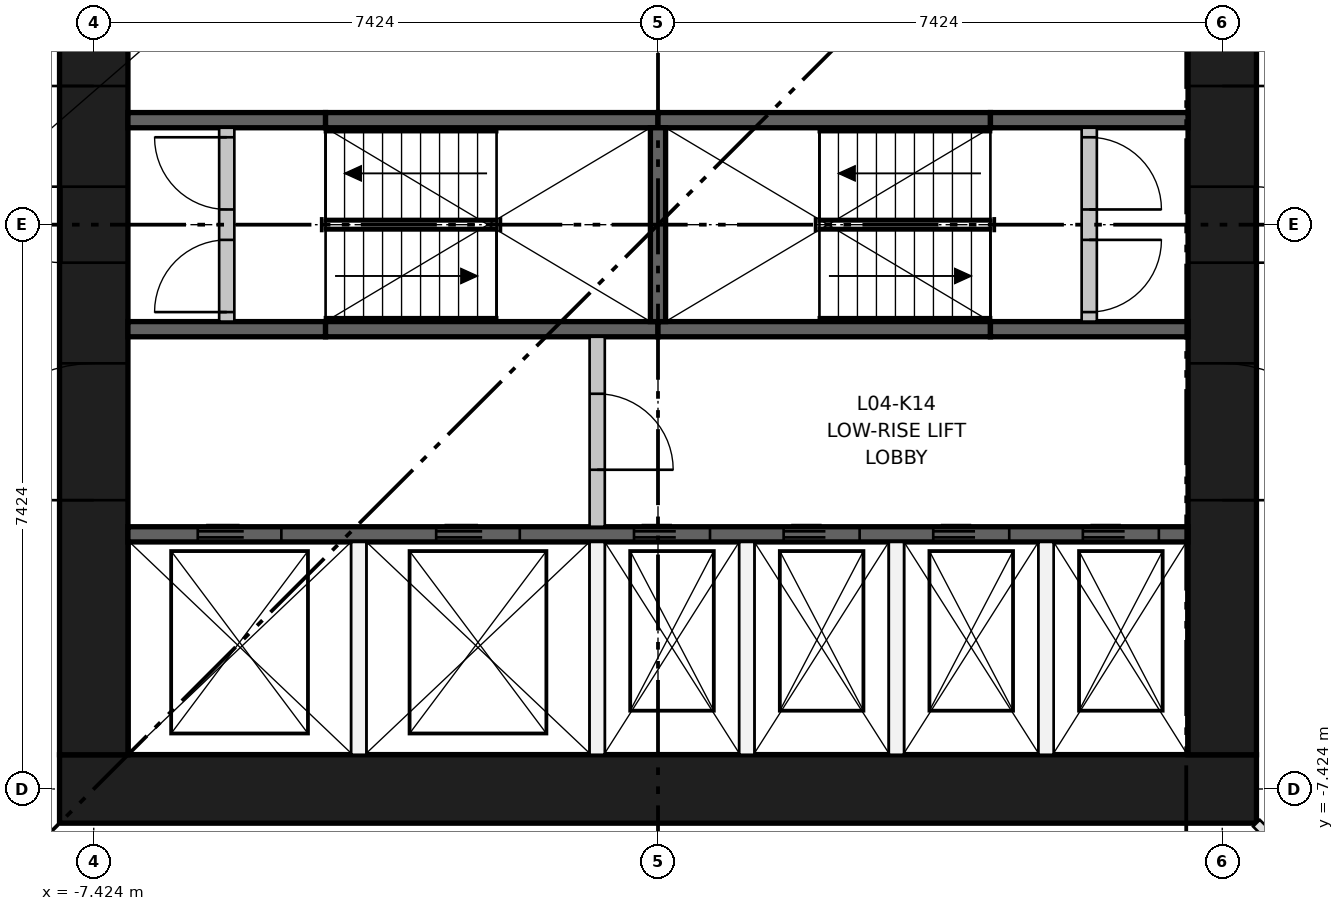
"""IFC4 building model, lengths in metres.
Left out: names, types, materials, properties, quantities, classifications, styles, units other than length and angle.
Written with IfcOpenShell. Run it as: python <this file> out.ifc"""

import sys

from ifc_helpers import new_model, si_unit, direction, frame, frame_2d, origin, place, context, subcontext, project, spatial, rectangle, extrude, element, fill, save


model = new_model("IFC4")
c1 = context("Model", 3, precision=1e-05, world=origin(), true_north=direction((0.0, 1.0)))
c2 = subcontext(c1, "Body", "Model", "MODEL_VIEW")
j1 = project(units=[si_unit("LENGTHUNIT", "METRE"), si_unit("PLANEANGLEUNIT", "RADIAN")], contexts=[c1])
p1 = place(None, origin())
s1 = spatial("IfcSite", under=j1, at=p1, CompositionType="ELEMENT")
p2 = place(p1, origin())
s2 = spatial("IfcBuilding", under=s1, at=p2, CompositionType="ELEMENT")
p3 = place(p2, frame((0.0, 0.0, 18.5)))
s3 = spatial("IfcBuildingStorey", under=s2, at=p3, CompositionType="ELEMENT", Elevation=18.5)
p4 = place(p3, frame((-7.874, -7.424, 0.0), z_axis=(0.0, 0.0, 1.0), x_axis=(1.0, 0.0, 0.0)))
e1 = element("IfcWall", 1, at=p4, inside=s3, PredefinedType="SHEAR", context=c2, shape_type="SweptSolid", body=[
    extrude(rectangle(XDim=15.748, YDim=0.9, at=frame_2d((7.874, 0.0))), origin(), (0.0, 0.0, 1.0), 3.9),
])
p5 = place(p3, frame((-7.424, -6.974, 0.0), z_axis=(0.0, 0.0, 1.0), x_axis=(0.0, 1.0, 0.0)))
e2 = element("IfcWall", 2, at=p5, inside=s3, PredefinedType="SHEAR", context=c2, shape_type="SweptSolid", body=[
    extrude(rectangle(XDim=13.948, YDim=0.9, at=frame_2d((6.974, 0.0))), origin(), (0.0, 0.0, 1.0), 3.9),
])
p6 = place(p5, frame((6.474, 0.0, 0.0)))
e3 = element("IfcOpeningElement", 3, at=p6, cuts=e2, PredefinedType="OPENING", context=c2, shape_type="SweptSolid", body=[
    extrude(rectangle(XDim=1.0, YDim=2.1, at=frame_2d((0.5, 1.05))), frame((0.0, 0.46, 0.0), z_axis=(0.0, -1.0, 0.0), x_axis=(1.0, 0.0, 0.0)), (0.0, 0.0, 1.0), 0.92),
])
p7 = place(p5, frame((3.35, 0.0, 0.0)))
e4 = element("IfcOpeningElement", 4, at=p7, cuts=e2, PredefinedType="OPENING", context=c2, shape_type="SweptSolid", body=[
    extrude(rectangle(XDim=1.8, YDim=2.1, at=frame_2d((0.9, 1.05))), frame((0.0, 0.46, 0.0), z_axis=(0.0, -1.0, 0.0), x_axis=(1.0, 0.0, 0.0)), (0.0, 0.0, 1.0), 0.92),
])
p8 = place(p5, frame((8.799, 0.0, 0.0)))
e5 = element("IfcOpeningElement", 5, at=p8, cuts=e2, PredefinedType="OPENING", context=c2, shape_type="SweptSolid", body=[
    extrude(rectangle(XDim=1.8, YDim=2.1, at=frame_2d((0.9, 1.05))), frame((0.0, 0.46, 0.0), z_axis=(0.0, -1.0, 0.0), x_axis=(1.0, 0.0, 0.0)), (0.0, 0.0, 1.0), 0.92),
])
p9 = place(p5, frame((11.974, 0.0, 0.0)))
e6 = element("IfcOpeningElement", 6, at=p9, cuts=e2, PredefinedType="OPENING", context=c2, shape_type="SweptSolid", body=[
    extrude(rectangle(XDim=1.0, YDim=2.1, at=frame_2d((0.5, 1.05))), frame((0.0, 0.46, 0.0), z_axis=(0.0, -1.0, 0.0), x_axis=(1.0, 0.0, 0.0)), (0.0, 0.0, 1.0), 0.92),
])
p10 = place(p3, frame((7.424, -6.974, 0.0), z_axis=(0.0, 0.0, 1.0), x_axis=(0.0, 1.0, 0.0)))
e7 = element("IfcWall", 7, at=p10, inside=s3, PredefinedType="SHEAR", context=c2, shape_type="SweptSolid", body=[
    extrude(rectangle(XDim=13.948, YDim=0.9, at=frame_2d((6.974, 0.0))), origin(), (0.0, 0.0, 1.0), 3.9),
])
p11 = place(p10, frame((6.474, 0.0, 0.0)))
e8 = element("IfcOpeningElement", 8, at=p11, cuts=e7, PredefinedType="OPENING", context=c2, shape_type="SweptSolid", body=[
    extrude(rectangle(XDim=1.0, YDim=2.1, at=frame_2d((0.5, 1.05))), frame((0.0, 0.46, 0.0), z_axis=(0.0, -1.0, 0.0), x_axis=(1.0, 0.0, 0.0)), (0.0, 0.0, 1.0), 0.92),
])
p12 = place(p10, frame((3.35, 0.0, 0.0)))
e9 = element("IfcOpeningElement", 9, at=p12, cuts=e7, PredefinedType="OPENING", context=c2, shape_type="SweptSolid", body=[
    extrude(rectangle(XDim=1.8, YDim=2.1, at=frame_2d((0.9, 1.05))), frame((0.0, 0.46, 0.0), z_axis=(0.0, -1.0, 0.0), x_axis=(1.0, 0.0, 0.0)), (0.0, 0.0, 1.0), 0.92),
])
p13 = place(p10, frame((8.799, 0.0, 0.0)))
e10 = element("IfcOpeningElement", 10, at=p13, cuts=e7, PredefinedType="OPENING", context=c2, shape_type="SweptSolid", body=[
    extrude(rectangle(XDim=1.8, YDim=2.1, at=frame_2d((0.9, 1.05))), frame((0.0, 0.46, 0.0), z_axis=(0.0, -1.0, 0.0), x_axis=(1.0, 0.0, 0.0)), (0.0, 0.0, 1.0), 0.92),
])
p14 = place(p3, frame((-6.974, -4.074, 0.0), z_axis=(0.0, 0.0, 1.0), x_axis=(1.0, 0.0, 0.0)))
e11 = element("IfcWall", 11, at=p14, inside=s3, PredefinedType="SHEAR", context=c2, shape_type="SweptSolid", body=[
    extrude(rectangle(XDim=13.948, YDim=0.2, at=frame_2d((6.974, 0.0))), origin(), (0.0, 0.0, 1.0), 3.55),
])
p15 = place(p14, frame((0.918, 0.0, 0.0)))
e12 = element("IfcOpeningElement", 12, at=p15, cuts=e11, PredefinedType="OPENING", context=c2, shape_type="SweptSolid", body=[
    extrude(rectangle(XDim=1.1, YDim=2.1, at=frame_2d((0.55, 1.05))), frame((0.0, 0.11, 0.0), z_axis=(0.0, -1.0, 0.0), x_axis=(1.0, 0.0, 0.0)), (0.0, 0.0, 1.0), 0.22),
])
p16 = place(p14, frame((4.055, 0.0, 0.0)))
e13 = element("IfcOpeningElement", 13, at=p16, cuts=e11, PredefinedType="OPENING", context=c2, shape_type="SweptSolid", body=[
    extrude(rectangle(XDim=1.1, YDim=2.1, at=frame_2d((0.55, 1.05))), frame((0.0, 0.11, 0.0), z_axis=(0.0, -1.0, 0.0), x_axis=(1.0, 0.0, 0.0)), (0.0, 0.0, 1.0), 0.22),
])
p17 = place(p14, frame((6.658, 0.0, 0.0)))
e14 = element("IfcOpeningElement", 14, at=p17, cuts=e11, PredefinedType="OPENING", context=c2, shape_type="SweptSolid", body=[
    extrude(rectangle(XDim=1.0, YDim=2.1, at=frame_2d((0.5, 1.05))), frame((0.0, 0.11, 0.0), z_axis=(0.0, -1.0, 0.0), x_axis=(1.0, 0.0, 0.0)), (0.0, 0.0, 1.0), 0.22),
])
p18 = place(p14, frame((8.627, 0.0, 0.0)))
e15 = element("IfcOpeningElement", 15, at=p18, cuts=e11, PredefinedType="OPENING", context=c2, shape_type="SweptSolid", body=[
    extrude(rectangle(XDim=1.0, YDim=2.1, at=frame_2d((0.5, 1.05))), frame((0.0, 0.11, 0.0), z_axis=(0.0, -1.0, 0.0), x_axis=(1.0, 0.0, 0.0)), (0.0, 0.0, 1.0), 0.22),
])
p19 = place(p14, frame((10.595, 0.0, 0.0)))
e16 = element("IfcOpeningElement", 16, at=p19, cuts=e11, PredefinedType="OPENING", context=c2, shape_type="SweptSolid", body=[
    extrude(rectangle(XDim=1.0, YDim=2.1, at=frame_2d((0.5, 1.05))), frame((0.0, 0.11, 0.0), z_axis=(0.0, -1.0, 0.0), x_axis=(1.0, 0.0, 0.0)), (0.0, 0.0, 1.0), 0.22),
])
p20 = place(p14, frame((12.564, 0.0, 0.0)))
e17 = element("IfcOpeningElement", 17, at=p20, cuts=e11, PredefinedType="OPENING", context=c2, shape_type="SweptSolid", body=[
    extrude(rectangle(XDim=1.0, YDim=2.1, at=frame_2d((0.5, 1.05))), frame((0.0, 0.11, 0.0), z_axis=(0.0, -1.0, 0.0), x_axis=(1.0, 0.0, 0.0)), (0.0, 0.0, 1.0), 0.22),
])
p21 = place(p3, frame((-6.974, -1.375, 0.0), z_axis=(0.0, 0.0, 1.0), x_axis=(1.0, 0.0, 0.0)))
e18 = element("IfcWall", 18, at=p21, inside=s3, PredefinedType="SHEAR", context=c2, shape_type="SweptSolid", body=[
    extrude(rectangle(XDim=2.6, YDim=0.2, at=frame_2d((1.3, 0.0))), origin(), (0.0, 0.0, 1.0), 3.55),
])
for number, where, z_axis, x_axis in (
    (19, (-4.374, -1.375, 0.0), (0.0, 0.0, 1.0), (1.0, 0.0, 0.0)),
    (20, (0.0, -1.375, 0.0), (0.0, 0.0, 1.0), (1.0, 0.0, 0.0)),
):
    element("IfcWall", number, at=place(p3, frame(where, z_axis=z_axis, x_axis=x_axis)), inside=s3, PredefinedType="SHEAR", context=c2, shape_type="SweptSolid", body=[
        extrude(rectangle(XDim=4.374, YDim=0.2, at=frame_2d((2.187, 0.0))), origin(), (0.0, 0.0, 1.0), 3.55),
    ])
for number, where, z_axis, x_axis in (
    (21, (4.374, -1.375, 0.0), (0.0, 0.0, 1.0), (1.0, 0.0, 0.0)),
    (22, (-6.974, 1.375, 0.0), (0.0, 0.0, 1.0), (1.0, 0.0, 0.0)),
):
    element("IfcWall", number, at=place(p3, frame(where, z_axis=z_axis, x_axis=x_axis)), inside=s3, PredefinedType="SHEAR", context=c2, shape_type="SweptSolid", body=[
        extrude(rectangle(XDim=2.6, YDim=0.2, at=frame_2d((1.3, 0.0))), origin(), (0.0, 0.0, 1.0), 3.55),
    ])
for number, where, z_axis, x_axis in (
    (23, (-4.374, 1.375, 0.0), (0.0, 0.0, 1.0), (1.0, 0.0, 0.0)),
    (24, (0.0, 1.375, 0.0), (0.0, 0.0, 1.0), (1.0, 0.0, 0.0)),
):
    element("IfcWall", number, at=place(p3, frame(where, z_axis=z_axis, x_axis=x_axis)), inside=s3, PredefinedType="SHEAR", context=c2, shape_type="SweptSolid", body=[
        extrude(rectangle(XDim=4.374, YDim=0.2, at=frame_2d((2.187, 0.0))), origin(), (0.0, 0.0, 1.0), 3.55),
    ])
p22 = place(p3, frame((4.374, 1.375, 0.0), z_axis=(0.0, 0.0, 1.0), x_axis=(1.0, 0.0, 0.0)))
e25 = element("IfcWall", 25, at=p22, inside=s3, PredefinedType="SHEAR", context=c2, shape_type="SweptSolid", body=[
    extrude(rectangle(XDim=2.6, YDim=0.2, at=frame_2d((1.3, 0.0))), origin(), (0.0, 0.0, 1.0), 3.55),
])
p23 = place(p3, frame((0.0, -1.275, 0.0), z_axis=(0.0, 0.0, 1.0), x_axis=(0.0, 1.0, 0.0)))
e26 = element("IfcWall", 26, at=p23, inside=s3, PredefinedType="SHEAR", context=c2, shape_type="SweptSolid", body=[
    extrude(rectangle(XDim=2.55, YDim=0.2, at=frame_2d((1.275, 0.0))), origin(), (0.0, 0.0, 1.0), 3.55),
])
for number, where, z_axis, x_axis in (
    (27, (-3.937, -6.974, 0.0), (0.0, 0.0, 1.0), (0.0, 1.0, 0.0)),
    (28, (-0.8, -6.974, 0.0), (0.0, 0.0, 1.0), (0.0, 1.0, 0.0)),
):
    element("IfcWall", number, at=place(p3, frame(where, z_axis=z_axis, x_axis=x_axis)), inside=s3, PredefinedType="PARTITIONING", context=c2, shape_type="SweptSolid", body=[
        extrude(rectangle(XDim=2.8, YDim=0.2, at=frame_2d((1.4, 0.0))), origin(), (0.0, 0.0, 1.0), 3.55),
    ])
p24 = place(p3, frame((-0.8, -3.974, 0.0), z_axis=(0.0, 0.0, 1.0), x_axis=(0.0, 1.0, 0.0)))
e29 = element("IfcWall", 29, at=p24, inside=s3, PredefinedType="PARTITIONING", context=c2, shape_type="SweptSolid", body=[
    extrude(rectangle(XDim=2.499, YDim=0.2, at=frame_2d((1.25, 0.0))), origin(), (0.0, 0.0, 1.0), 3.55),
])
p25 = place(p24, frame((0.75, 0.0, 0.0)))
e30 = element("IfcOpeningElement", 30, at=p25, cuts=e29, PredefinedType="OPENING", context=c2, shape_type="SweptSolid", body=[
    extrude(rectangle(XDim=1.0, YDim=2.1, at=frame_2d((0.5, 1.05))), frame((0.0, 0.11, 0.0), z_axis=(0.0, -1.0, 0.0), x_axis=(1.0, 0.0, 0.0)), (0.0, 0.0, 1.0), 0.22),
])
for number, where, z_axis, x_axis in (
    (31, (1.168, -6.974, 0.0), (0.0, 0.0, 1.0), (0.0, 1.0, 0.0)),
    (32, (3.137, -6.974, 0.0), (0.0, 0.0, 1.0), (0.0, 1.0, 0.0)),
    (33, (5.105, -6.974, 0.0), (0.0, 0.0, 1.0), (0.0, 1.0, 0.0)),
):
    element("IfcWall", number, at=place(p3, frame(where, z_axis=z_axis, x_axis=x_axis)), inside=s3, PredefinedType="PARTITIONING", context=c2, shape_type="SweptSolid", body=[
        extrude(rectangle(XDim=2.8, YDim=0.2, at=frame_2d((1.4, 0.0))), origin(), (0.0, 0.0, 1.0), 3.55),
    ])
p26 = place(p3, frame((-5.674, -1.275, 0.0), z_axis=(0.0, 0.0, 1.0), x_axis=(0.0, 1.0, 0.0)))
e34 = element("IfcWall", 34, at=p26, inside=s3, PredefinedType="PARTITIONING", context=c2, shape_type="SweptSolid", body=[
    extrude(rectangle(XDim=2.55, YDim=0.2, at=frame_2d((1.275, 0.0))), origin(), (0.0, 0.0, 1.0), 3.55),
])
p27 = place(p26, frame((0.125, 0.0, 0.0)))
e35 = element("IfcOpeningElement", 35, at=p27, cuts=e34, PredefinedType="OPENING", context=c2, shape_type="SweptSolid", body=[
    extrude(rectangle(XDim=0.95, YDim=2.1, at=frame_2d((0.475, 1.05))), frame((0.0, 0.11, 0.0), z_axis=(0.0, -1.0, 0.0), x_axis=(1.0, 0.0, 0.0)), (0.0, 0.0, 1.0), 0.22),
])
p28 = place(p26, frame((1.475, 0.0, 0.0)))
e36 = element("IfcOpeningElement", 36, at=p28, cuts=e34, PredefinedType="OPENING", context=c2, shape_type="SweptSolid", body=[
    extrude(rectangle(XDim=0.95, YDim=2.1, at=frame_2d((0.475, 1.05))), frame((0.0, 0.11, 0.0), z_axis=(0.0, -1.0, 0.0), x_axis=(1.0, 0.0, 0.0)), (0.0, 0.0, 1.0), 0.22),
])
p29 = place(p3, frame((5.674, -1.275, 0.0), z_axis=(0.0, 0.0, 1.0), x_axis=(0.0, 1.0, 0.0)))
e37 = element("IfcWall", 37, at=p29, inside=s3, PredefinedType="PARTITIONING", context=c2, shape_type="SweptSolid", body=[
    extrude(rectangle(XDim=2.55, YDim=0.2, at=frame_2d((1.275, 0.0))), origin(), (0.0, 0.0, 1.0), 3.55),
])
p30 = place(p29, frame((0.125, 0.0, 0.0)))
e38 = element("IfcOpeningElement", 38, at=p30, cuts=e37, PredefinedType="OPENING", context=c2, shape_type="SweptSolid", body=[
    extrude(rectangle(XDim=0.95, YDim=2.1, at=frame_2d((0.475, 1.05))), frame((0.0, 0.11, 0.0), z_axis=(0.0, -1.0, 0.0), x_axis=(1.0, 0.0, 0.0)), (0.0, 0.0, 1.0), 0.22),
])
p31 = place(p29, frame((1.475, 0.0, 0.0)))
e39 = element("IfcOpeningElement", 39, at=p31, cuts=e37, PredefinedType="OPENING", context=c2, shape_type="SweptSolid", body=[
    extrude(rectangle(XDim=0.95, YDim=2.1, at=frame_2d((0.475, 1.05))), frame((0.0, 0.11, 0.0), z_axis=(0.0, -1.0, 0.0), x_axis=(1.0, 0.0, 0.0)), (0.0, 0.0, 1.0), 0.22),
])
p32 = place(p3, frame((9.36, -9.36, 0.0), z_axis=(0.0, 0.0, 1.0), x_axis=(-0.707106781187, 0.707106781187, 0.0)))
e40 = element("IfcWall", 40, at=p32, inside=s3, PredefinedType="PARTITIONING", context=c2, shape_type="SweptSolid", body=[
    extrude(rectangle(XDim=2.102, YDim=0.125, at=frame_2d((1.051, 0.0))), origin(), (0.0, 0.0, 1.0), 3.55),
])
p33 = place(p32, frame((0.6, 0.0, 0.0)))
e41 = element("IfcOpeningElement", 41, at=p33, cuts=e40, PredefinedType="OPENING", context=c2, shape_type="SweptSolid", body=[
    extrude(rectangle(XDim=1.0, YDim=2.1, at=frame_2d((0.5, 1.05))), frame((0.0, 0.073, 0.0), z_axis=(0.0, -1.0, 0.0), x_axis=(1.0, 0.0, 0.0)), (0.0, 0.0, 1.0), 0.145),
])
p34 = place(p15, origin())
e42 = element("IfcDoor", 42, at=p34, inside=s3, OperationType="DOUBLE_DOOR_SLIDING", PredefinedType="DOOR", context=c2, shape_type="SweptSolid", body=[
    extrude(rectangle(XDim=1.1, YDim=2.1, at=frame_2d((0.55, 1.05))), frame((0.0, 0.025, 0.0), z_axis=(0.0, -1.0, 0.0), x_axis=(1.0, 0.0, 0.0)), (0.0, 0.0, 1.0), 0.05),
])
fill(e12, e42)
p35 = place(p16, origin())
e43 = element("IfcDoor", 43, at=p35, inside=s3, OperationType="DOUBLE_DOOR_SLIDING", PredefinedType="DOOR", context=c2, shape_type="SweptSolid", body=[
    extrude(rectangle(XDim=1.1, YDim=2.1, at=frame_2d((0.55, 1.05))), frame((0.0, 0.025, 0.0), z_axis=(0.0, -1.0, 0.0), x_axis=(1.0, 0.0, 0.0)), (0.0, 0.0, 1.0), 0.05),
])
fill(e13, e43)
p36 = place(p17, origin())
e44 = element("IfcDoor", 44, at=p36, inside=s3, OperationType="DOUBLE_DOOR_SLIDING", PredefinedType="DOOR", context=c2, shape_type="SweptSolid", body=[
    extrude(rectangle(XDim=1.0, YDim=2.1, at=frame_2d((0.5, 1.05))), frame((0.0, 0.025, 0.0), z_axis=(0.0, -1.0, 0.0), x_axis=(1.0, 0.0, 0.0)), (0.0, 0.0, 1.0), 0.05),
])
fill(e14, e44)
p37 = place(p18, origin())
e45 = element("IfcDoor", 45, at=p37, inside=s3, OperationType="DOUBLE_DOOR_SLIDING", PredefinedType="DOOR", context=c2, shape_type="SweptSolid", body=[
    extrude(rectangle(XDim=1.0, YDim=2.1, at=frame_2d((0.5, 1.05))), frame((0.0, 0.025, 0.0), z_axis=(0.0, -1.0, 0.0), x_axis=(1.0, 0.0, 0.0)), (0.0, 0.0, 1.0), 0.05),
])
fill(e15, e45)
p38 = place(p19, origin())
e46 = element("IfcDoor", 46, at=p38, inside=s3, OperationType="DOUBLE_DOOR_SLIDING", PredefinedType="DOOR", context=c2, shape_type="SweptSolid", body=[
    extrude(rectangle(XDim=1.0, YDim=2.1, at=frame_2d((0.5, 1.05))), frame((0.0, 0.025, 0.0), z_axis=(0.0, -1.0, 0.0), x_axis=(1.0, 0.0, 0.0)), (0.0, 0.0, 1.0), 0.05),
])
fill(e16, e46)
p39 = place(p20, origin())
e47 = element("IfcDoor", 47, at=p39, inside=s3, OperationType="DOUBLE_DOOR_SLIDING", PredefinedType="DOOR", context=c2, shape_type="SweptSolid", body=[
    extrude(rectangle(XDim=1.0, YDim=2.1, at=frame_2d((0.5, 1.05))), frame((0.0, 0.025, 0.0), z_axis=(0.0, -1.0, 0.0), x_axis=(1.0, 0.0, 0.0)), (0.0, 0.0, 1.0), 0.05),
])
fill(e17, e47)
p40 = place(p27, origin())
e48 = element("IfcDoor", 48, at=p40, inside=s3, OperationType="SINGLE_SWING_LEFT", PredefinedType="DOOR", context=c2, shape_type="SweptSolid", body=[
    extrude(rectangle(XDim=0.95, YDim=2.1, at=frame_2d((0.475, 1.05))), frame((0.0, 0.025, 0.0), z_axis=(0.0, -1.0, 0.0), x_axis=(1.0, 0.0, 0.0)), (0.0, 0.0, 1.0), 0.05),
])
fill(e35, e48)
p41 = place(p28, origin())
e49 = element("IfcDoor", 49, at=p41, inside=s3, OperationType="SINGLE_SWING_RIGHT", PredefinedType="DOOR", context=c2, shape_type="SweptSolid", body=[
    extrude(rectangle(XDim=0.95, YDim=2.1, at=frame_2d((0.475, 1.05))), frame((0.0, 0.025, 0.0), z_axis=(0.0, -1.0, 0.0), x_axis=(1.0, 0.0, 0.0)), (0.0, 0.0, 1.0), 0.05),
])
fill(e36, e49)
p42 = place(p30, frame((0.95, 0.0, 0.0), z_axis=(0.0, 0.0, 1.0), x_axis=(-1.0, 0.0, 0.0)))
e50 = element("IfcDoor", 50, at=p42, inside=s3, OperationType="SINGLE_SWING_RIGHT", PredefinedType="DOOR", context=c2, shape_type="SweptSolid", body=[
    extrude(rectangle(XDim=0.95, YDim=2.1, at=frame_2d((0.475, 1.05))), frame((0.0, 0.025, 0.0), z_axis=(0.0, -1.0, 0.0), x_axis=(1.0, 0.0, 0.0)), (0.0, 0.0, 1.0), 0.05),
])
fill(e38, e50)
p43 = place(p31, frame((0.95, 0.0, 0.0), z_axis=(0.0, 0.0, 1.0), x_axis=(-1.0, 0.0, 0.0)))
e51 = element("IfcDoor", 51, at=p43, inside=s3, OperationType="SINGLE_SWING_LEFT", PredefinedType="DOOR", context=c2, shape_type="SweptSolid", body=[
    extrude(rectangle(XDim=0.95, YDim=2.1, at=frame_2d((0.475, 1.05))), frame((0.0, 0.025, 0.0), z_axis=(0.0, -1.0, 0.0), x_axis=(1.0, 0.0, 0.0)), (0.0, 0.0, 1.0), 0.05),
])
fill(e39, e51)
p44 = place(p25, frame((1.0, 0.0, 0.0), z_axis=(0.0, 0.0, 1.0), x_axis=(-1.0, 0.0, 0.0)))
e52 = element("IfcDoor", 52, at=p44, inside=s3, OperationType="SINGLE_SWING_LEFT", PredefinedType="DOOR", context=c2, shape_type="SweptSolid", body=[
    extrude(rectangle(XDim=1.0, YDim=2.1, at=frame_2d((0.5, 1.05))), frame((0.0, 0.025, 0.0), z_axis=(0.0, -1.0, 0.0), x_axis=(1.0, 0.0, 0.0)), (0.0, 0.0, 1.0), 0.05),
])
fill(e30, e52)
p45 = place(p6, origin())
e53 = element("IfcDoor", 53, at=p45, inside=s3, OperationType="SINGLE_SWING_RIGHT", PredefinedType="DOOR", context=c2, shape_type="SweptSolid", body=[
    extrude(rectangle(XDim=1.0, YDim=2.1, at=frame_2d((0.5, 1.05))), frame((0.0, 0.45, 0.0), z_axis=(0.0, -1.0, 0.0), x_axis=(1.0, 0.0, 0.0)), (0.0, 0.0, 1.0), 0.05),
])
fill(e3, e53)
p46 = place(p7, origin())
e54 = element("IfcDoor", 54, at=p46, inside=s3, OperationType="DOUBLE_DOOR_SINGLE_SWING", PredefinedType="DOOR", context=c2, shape_type="SweptSolid", body=[
    extrude(rectangle(XDim=1.8, YDim=2.1, at=frame_2d((0.9, 1.05))), frame((0.0, 0.025, 0.0), z_axis=(0.0, -1.0, 0.0), x_axis=(1.0, 0.0, 0.0)), (0.0, 0.0, 1.0), 0.05),
])
fill(e4, e54)
p47 = place(p8, origin())
e55 = element("IfcDoor", 55, at=p47, inside=s3, OperationType="DOUBLE_DOOR_SINGLE_SWING", PredefinedType="DOOR", context=c2, shape_type="SweptSolid", body=[
    extrude(rectangle(XDim=1.8, YDim=2.1, at=frame_2d((0.9, 1.05))), frame((0.0, 0.025, 0.0), z_axis=(0.0, -1.0, 0.0), x_axis=(1.0, 0.0, 0.0)), (0.0, 0.0, 1.0), 0.05),
])
fill(e5, e55)
p48 = place(p11, frame((1.0, 0.0, 0.0), z_axis=(0.0, 0.0, 1.0), x_axis=(-1.0, 0.0, 0.0)))
e56 = element("IfcDoor", 56, at=p48, inside=s3, OperationType="SINGLE_SWING_LEFT", PredefinedType="DOOR", context=c2, shape_type="SweptSolid", body=[
    extrude(rectangle(XDim=1.0, YDim=2.1, at=frame_2d((0.5, 1.05))), frame((0.0, 0.45, 0.0), z_axis=(0.0, -1.0, 0.0), x_axis=(1.0, 0.0, 0.0)), (0.0, 0.0, 1.0), 0.05),
])
fill(e8, e56)
p49 = place(p12, frame((1.8, 0.0, 0.0), z_axis=(0.0, 0.0, 1.0), x_axis=(-1.0, 0.0, 0.0)))
e57 = element("IfcDoor", 57, at=p49, inside=s3, OperationType="DOUBLE_DOOR_SINGLE_SWING", PredefinedType="DOOR", context=c2, shape_type="SweptSolid", body=[
    extrude(rectangle(XDim=1.8, YDim=2.1, at=frame_2d((0.9, 1.05))), frame((0.0, 0.025, 0.0), z_axis=(0.0, -1.0, 0.0), x_axis=(1.0, 0.0, 0.0)), (0.0, 0.0, 1.0), 0.05),
])
fill(e9, e57)
p50 = place(p13, frame((1.8, 0.0, 0.0), z_axis=(0.0, 0.0, 1.0), x_axis=(-1.0, 0.0, 0.0)))
e58 = element("IfcDoor", 58, at=p50, inside=s3, OperationType="DOUBLE_DOOR_SINGLE_SWING", PredefinedType="DOOR", context=c2, shape_type="SweptSolid", body=[
    extrude(rectangle(XDim=1.8, YDim=2.1, at=frame_2d((0.9, 1.05))), frame((0.0, 0.025, 0.0), z_axis=(0.0, -1.0, 0.0), x_axis=(1.0, 0.0, 0.0)), (0.0, 0.0, 1.0), 0.05),
])
fill(e10, e58)
save(model, sys.argv[1])
